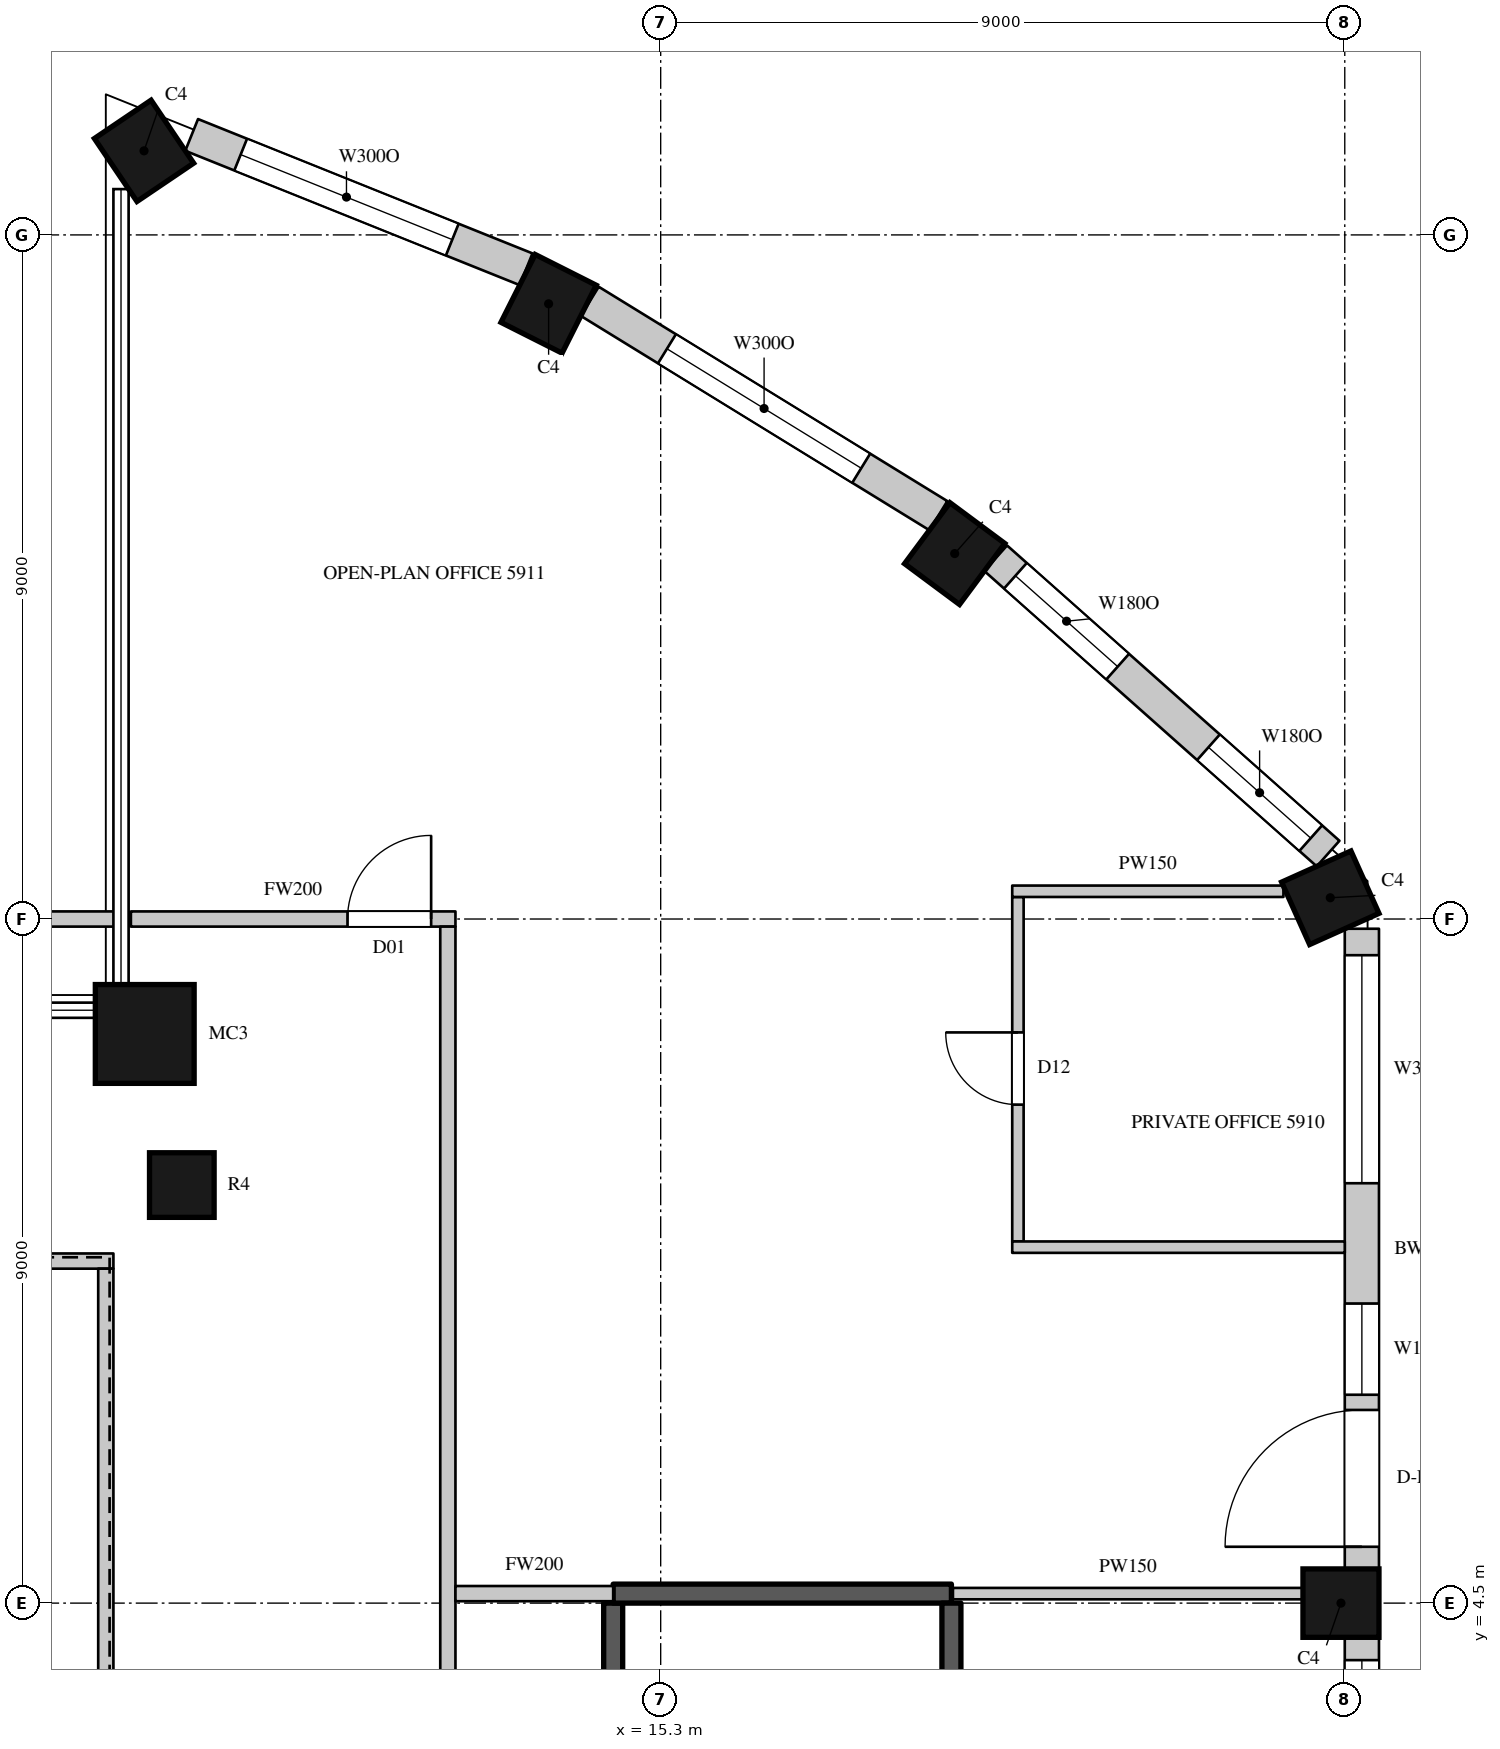
"""IFC4 building model, lengths in metres.
Left out: names, types, materials, properties, quantities, classifications, styles, units other than length and angle.
Written with IfcOpenShell. Run it as: python <this file> out.ifc"""

import sys

from ifc_helpers import new_model, si_unit, direction, frame, frame_2d, origin, origin_2d, place, context, subcontext, project, spatial, rectangle, circle, extrude, element, fill, save


model = new_model("IFC4")
c1 = context("Model", 3, precision=1e-05, world=origin(), true_north=direction((0.0, 1.0)))
c2 = subcontext(c1, "Body", "Model", "MODEL_VIEW")
j1 = project(units=[si_unit("LENGTHUNIT", "METRE"), si_unit("PLANEANGLEUNIT", "RADIAN")], contexts=[c1])
p1 = place(None, origin())
s1 = spatial("IfcSite", under=j1, at=p1, CompositionType="ELEMENT")
p2 = place(p1, origin())
s2 = spatial("IfcBuilding", under=s1, at=p2, CompositionType="ELEMENT")
p3 = place(p2, frame((0.0, 0.0, 263.9)))
s3 = spatial("IfcBuildingStorey", under=s2, at=p3, CompositionType="ELEMENT", Elevation=263.9)
p4 = place(p3, frame((8.503, 23.606, 0.0), z_axis=(0.0, 0.0, 1.0), x_axis=(-0.828469606019, -0.560034027451, 0.0)))
e1 = element("IfcColumn", 1, at=p4, inside=s3, PredefinedType="COLUMN", context=c2, shape_type="SweptSolid", body=[
    extrude(rectangle(XDim=0.9, YDim=1.0, at=origin_2d()), origin(), (0.0, 0.0, 1.0), 4.1),
])
p5 = place(p3, frame((8.512, 11.988, 0.0), z_axis=(0.0, 0.0, 1.0), x_axis=(1.0, 0.0, 0.0)))
e2 = element("IfcColumn", 2, at=p5, inside=s3, PredefinedType="COLUMN", context=c2, shape_type="SweptSolid", body=[
    extrude(circle(Radius=0.65, at=origin_2d()), origin(), (0.0, 0.0, 1.0), 4.1),
])
for number, where, z_axis, x_axis in (
    (3, (24.25, 4.5, 0.0), (0.0, 0.0, 1.0), (0.0, 1.0, 0.0)),
    (4, (24.11, 13.78, 0.0), (0.0, 0.0, 1.0), (-0.41, 0.912, 0.0)),
    (5, (19.168, 18.308, 0.0), (0.0, 0.0, 1.0), (-0.803, 0.596, 0.0)),
    (6, (13.826, 21.594, 0.0), (0.0, 0.0, 1.0), (-0.893, 0.45, 0.0)),
):
    element("IfcColumn", number, at=place(p3, frame(where, z_axis=z_axis, x_axis=x_axis)), inside=s3, PredefinedType="COLUMN", context=c2, shape_type="SweptSolid", body=[
        extrude(rectangle(XDim=0.9, YDim=1.0, at=origin_2d()), origin(), (0.0, 0.0, 1.0), 4.1),
    ])
p6 = place(p3, frame((9.0, 10.0, 0.0), z_axis=(0.0, 0.0, 1.0), x_axis=(1.0, 0.0, 0.0)))
e7 = element("IfcColumn", 7, at=p6, inside=s3, PredefinedType="COLUMN", context=c2, shape_type="SweptSolid", body=[
    extrude(circle(Radius=0.425, at=origin_2d()), origin(), (0.0, 0.0, 1.0), 4.1),
])
p7 = place(p3, frame((24.525, -4.05, 0.0), z_axis=(0.0, 0.0, 1.0), x_axis=(0.0, 1.0, 0.0)))
e8 = element("IfcWall", 8, at=p7, inside=s3, PredefinedType="SOLIDWALL", context=c2, shape_type="SweptSolid", body=[
    extrude(rectangle(XDim=8.1, YDim=0.45, at=frame_2d((4.05, 0.0))), origin(), (0.0, 0.0, 1.0), 3.8),
])
p8 = place(p7, frame((0.3, 0.0, 1.05)))
e9 = element("IfcOpeningElement", 9, at=p8, cuts=e8, PredefinedType="OPENING", context=c2, shape_type="SweptSolid", body=[
    extrude(rectangle(XDim=3.0, YDim=2.4, at=frame_2d((1.5, 1.2))), frame((0.0, 0.235, 0.0), z_axis=(0.0, -1.0, 0.0), x_axis=(1.0, 0.0, 0.0)), (0.0, 0.0, 1.0), 0.47),
])
p9 = place(p7, frame((4.8, 0.0, 1.05)))
e10 = element("IfcOpeningElement", 10, at=p9, cuts=e8, PredefinedType="OPENING", context=c2, shape_type="SweptSolid", body=[
    extrude(rectangle(XDim=3.0, YDim=2.4, at=frame_2d((1.5, 1.2))), frame((0.0, 0.235, 0.0), z_axis=(0.0, -1.0, 0.0), x_axis=(1.0, 0.0, 0.0)), (0.0, 0.0, 1.0), 0.47),
])
p10 = place(p3, frame((24.525, 4.95, 0.0), z_axis=(0.0, 0.0, 1.0), x_axis=(0.0, 1.0, 0.0)))
e11 = element("IfcWall", 11, at=p10, inside=s3, PredefinedType="SOLIDWALL", context=c2, shape_type="SweptSolid", body=[
    extrude(rectangle(XDim=8.422, YDim=0.45, at=frame_2d((4.211, 0.0))), origin(), (0.0, 0.0, 1.0), 3.8),
])
p11 = place(p10, frame((0.291, 0.0, 0.0)))
e12 = element("IfcOpeningElement", 12, at=p11, cuts=e11, PredefinedType="OPENING", context=c2, shape_type="SweptSolid", body=[
    extrude(rectangle(XDim=1.8, YDim=2.4, at=frame_2d((0.9, 1.2))), frame((0.0, 0.235, 0.0), z_axis=(0.0, -1.0, 0.0), x_axis=(1.0, 0.0, 0.0)), (0.0, 0.0, 1.0), 0.47),
])
p12 = place(p10, frame((2.291, 0.0, 1.05)))
e13 = element("IfcOpeningElement", 13, at=p12, cuts=e11, PredefinedType="OPENING", context=c2, shape_type="SweptSolid", body=[
    extrude(rectangle(XDim=1.2, YDim=2.4, at=frame_2d((0.6, 1.2))), frame((0.0, 0.235, 0.0), z_axis=(0.0, -1.0, 0.0), x_axis=(1.0, 0.0, 0.0)), (0.0, 0.0, 1.0), 0.47),
])
p13 = place(p10, frame((5.074, 0.0, 1.05)))
e14 = element("IfcOpeningElement", 14, at=p13, cuts=e11, PredefinedType="OPENING", context=c2, shape_type="SweptSolid", body=[
    extrude(rectangle(XDim=3.0, YDim=2.4, at=frame_2d((1.5, 1.2))), frame((0.0, 0.235, 0.0), z_axis=(0.0, -1.0, 0.0), x_axis=(1.0, 0.0, 0.0)), (0.0, 0.0, 1.0), 0.47),
])
p14 = place(p3, frame((24.081, 14.361, 0.0), z_axis=(0.0, 0.0, 1.0), x_axis=(-0.747570482973, 0.664182484704, 0.0)))
e15 = element("IfcWall", 15, at=p14, inside=s3, PredefinedType="SOLIDWALL", context=c2, shape_type="SweptSolid", body=[
    extrude(rectangle(XDim=5.85, YDim=0.45, at=frame_2d((2.925, 0.0))), origin(), (0.0, 0.0, 1.0), 3.8),
])
p15 = place(p14, frame((0.305, 0.0, 1.05)))
e16 = element("IfcOpeningElement", 16, at=p15, cuts=e15, PredefinedType="OPENING", context=c2, shape_type="SweptSolid", body=[
    extrude(rectangle(XDim=1.8, YDim=2.4, at=frame_2d((0.9, 1.2))), frame((0.0, 0.235, 0.0), z_axis=(0.0, -1.0, 0.0), x_axis=(1.0, 0.0, 0.0)), (0.0, 0.0, 1.0), 0.47),
])
p16 = place(p14, frame((3.703, 0.0, 1.05)))
e17 = element("IfcOpeningElement", 17, at=p16, cuts=e15, PredefinedType="OPENING", context=c2, shape_type="SweptSolid", body=[
    extrude(rectangle(XDim=1.8, YDim=2.4, at=frame_2d((0.9, 1.2))), frame((0.0, 0.235, 0.0), z_axis=(0.0, -1.0, 0.0), x_axis=(1.0, 0.0, 0.0)), (0.0, 0.0, 1.0), 0.47),
])
p17 = place(p3, frame((18.953, 18.806, 0.0), z_axis=(0.0, 0.0, 1.0), x_axis=(-0.851860664503, 0.523768468193, 0.0)))
e18 = element("IfcWall", 18, at=p17, inside=s3, PredefinedType="SOLIDWALL", context=c2, shape_type="SweptSolid", body=[
    extrude(rectangle(XDim=5.384, YDim=0.45, at=frame_2d((2.692, 0.0))), origin(), (0.0, 0.0, 1.0), 3.8),
])
p18 = place(p17, frame((1.192, 0.0, 1.05)))
e19 = element("IfcOpeningElement", 19, at=p18, cuts=e18, PredefinedType="OPENING", context=c2, shape_type="SweptSolid", body=[
    extrude(rectangle(XDim=3.0, YDim=2.4, at=frame_2d((1.5, 1.2))), frame((0.0, 0.235, 0.0), z_axis=(0.0, -1.0, 0.0), x_axis=(1.0, 0.0, 0.0)), (0.0, 0.0, 1.0), 0.47),
])
p19 = place(p3, frame((13.529, 22.048, 0.0), z_axis=(0.0, 0.0, 1.0), x_axis=(-0.927957332619, 0.372686448424, 0.0)))
e20 = element("IfcWall", 20, at=p19, inside=s3, PredefinedType="SOLIDWALL", context=c2, shape_type="SweptSolid", body=[
    extrude(rectangle(XDim=4.741, YDim=0.45, at=frame_2d((2.371, 0.0))), origin(), (0.0, 0.0, 1.0), 3.8),
])
p20 = place(p19, frame((1.047, 0.0, 1.05)))
e21 = element("IfcOpeningElement", 21, at=p20, cuts=e20, PredefinedType="OPENING", context=c2, shape_type="SweptSolid", body=[
    extrude(rectangle(XDim=3.0, YDim=2.4, at=frame_2d((1.5, 1.2))), frame((0.0, 0.235, 0.0), z_axis=(0.0, -1.0, 0.0), x_axis=(1.0, 0.0, 0.0)), (0.0, 0.0, 1.0), 0.47),
])
p21 = place(p3, frame((-6.27, 13.5, 0.0), z_axis=(0.0, 0.0, 1.0), x_axis=(1.0, 0.0, 0.0)))
e22 = element("IfcWall", 22, at=p21, inside=s3, PredefinedType="PARTITIONING", context=c2, shape_type="SweptSolid", body=[
    extrude(rectangle(XDim=14.57, YDim=0.2, at=frame_2d((7.285, 0.0))), origin(), (0.0, 0.0, 1.0), 3.8),
])
p22 = place(p3, frame((-6.1, 9.0, 0.0), z_axis=(0.0, 0.0, 1.0), x_axis=(1.0, 0.0, 0.0)))
e23 = element("IfcWall", 23, at=p22, inside=s3, PredefinedType="PARTITIONING", context=c2, shape_type="SweptSolid", body=[
    extrude(rectangle(XDim=14.2, YDim=0.2, at=frame_2d((7.1, 0.0))), origin(), (0.0, 0.0, 1.0), 3.8),
])
p23 = place(p3, frame((8.0, -8.9, 0.0), z_axis=(0.0, 0.0, 1.0), x_axis=(0.0, 1.0, 0.0)))
e24 = element("IfcWall", 24, at=p23, inside=s3, PredefinedType="PARTITIONING", context=c2, shape_type="SweptSolid", body=[
    extrude(rectangle(XDim=17.8, YDim=0.2, at=frame_2d((8.9, 0.0))), origin(), (0.0, 0.0, 1.0), 3.8),
])
p24 = place(p3, frame((8.33, 13.5, 0.0), z_axis=(0.0, 0.0, 1.0), x_axis=(1.0, 0.0, 0.0)))
e25 = element("IfcWall", 25, at=p24, inside=s3, PredefinedType="PARTITIONING", context=c2, shape_type="SweptSolid", body=[
    extrude(rectangle(XDim=4.27, YDim=0.2, at=frame_2d((2.135, 0.0))), origin(), (0.0, 0.0, 1.0), 3.8),
])
p25 = place(p24, frame((2.85, 0.0, 0.0)))
e26 = element("IfcOpeningElement", 26, at=p25, cuts=e25, PredefinedType="OPENING", context=c2, shape_type="SweptSolid", body=[
    extrude(rectangle(XDim=1.1, YDim=2.4, at=frame_2d((0.55, 1.2))), frame((0.0, 0.11, 0.0), z_axis=(0.0, -1.0, 0.0), x_axis=(1.0, 0.0, 0.0)), (0.0, 0.0, 1.0), 0.22),
])
p26 = place(p3, frame((12.5, -13.5, 0.0), z_axis=(0.0, 0.0, 1.0), x_axis=(0.0, 1.0, 0.0)))
e27 = element("IfcWall", 27, at=p26, inside=s3, PredefinedType="PARTITIONING", context=c2, shape_type="SweptSolid", body=[
    extrude(rectangle(XDim=26.9, YDim=0.2, at=frame_2d((13.45, 0.0))), origin(), (0.0, 0.0, 1.0), 3.8),
])
p27 = place(p26, frame((12.75, 0.0, 0.0)))
e28 = element("IfcOpeningElement", 28, at=p27, cuts=e27, PredefinedType="OPENING", context=c2, shape_type="SweptSolid", body=[
    extrude(rectangle(XDim=1.5, YDim=2.4, at=frame_2d((0.75, 1.2))), frame((0.0, 0.11, 0.0), z_axis=(0.0, -1.0, 0.0), x_axis=(1.0, 0.0, 0.0)), (0.0, 0.0, 1.0), 0.22),
])
p28 = place(p3, frame((12.6, 4.625, 0.0), z_axis=(0.0, 0.0, 1.0), x_axis=(1.0, 0.0, 0.0)))
e29 = element("IfcWall", 29, at=p28, inside=s3, PredefinedType="PARTITIONING", context=c2, shape_type="SweptSolid", body=[
    extrude(rectangle(XDim=2.075, YDim=0.2, at=frame_2d((1.038, 0.0))), origin(), (0.0, 0.0, 1.0), 3.8),
])
p29 = place(p3, frame((19.145, 4.625, 0.0), z_axis=(0.0, 0.0, 1.0), x_axis=(1.0, 0.0, 0.0)))
e30 = element("IfcWall", 30, at=p29, inside=s3, PredefinedType="PARTITIONING", context=c2, shape_type="SweptSolid", body=[
    extrude(rectangle(XDim=4.605, YDim=0.15, at=frame_2d((2.302, 0.0))), origin(), (0.0, 0.0, 1.0), 3.8),
])
p30 = place(p3, frame((20.0, 9.258, 0.0), z_axis=(0.0, 0.0, 1.0), x_axis=(0.0, 1.0, 0.0)))
e31 = element("IfcWall", 31, at=p30, inside=s3, PredefinedType="PARTITIONING", context=c2, shape_type="SweptSolid", body=[
    extrude(rectangle(XDim=4.532, YDim=0.15, at=frame_2d((2.266, 0.0))), origin(), (0.0, 0.0, 1.0), 3.8),
])
p31 = place(p30, frame((1.8, 0.0, 0.0)))
e32 = element("IfcOpeningElement", 32, at=p31, cuts=e31, PredefinedType="OPENING", context=c2, shape_type="SweptSolid", body=[
    extrude(rectangle(XDim=0.95, YDim=2.2, at=frame_2d((0.475, 1.1))), frame((0.0, 0.085, 0.0), z_axis=(0.0, -1.0, 0.0), x_axis=(1.0, 0.0, 0.0)), (0.0, 0.0, 1.0), 0.17),
])
p32 = place(p3, frame((19.925, 9.183, 0.0), z_axis=(0.0, 0.0, 1.0), x_axis=(1.0, 0.0, 0.0)))
e33 = element("IfcWall", 33, at=p32, inside=s3, PredefinedType="PARTITIONING", context=c2, shape_type="SweptSolid", body=[
    extrude(rectangle(XDim=4.375, YDim=0.15, at=frame_2d((2.188, 0.0))), origin(), (0.0, 0.0, 1.0), 3.15),
])
p33 = place(p3, frame((19.925, 13.865, 0.0), z_axis=(0.0, 0.0, 1.0), x_axis=(1.0, 0.0, 0.0)))
e34 = element("IfcWall", 34, at=p33, inside=s3, PredefinedType="PARTITIONING", context=c2, shape_type="SweptSolid", body=[
    extrude(rectangle(XDim=3.568, YDim=0.15, at=frame_2d((1.784, 0.0))), origin(), (0.0, 0.0, 1.0), 3.8),
])
p34 = place(p3, frame((14.675, -4.5, 0.0), z_axis=(0.0, 0.0, 1.0), x_axis=(0.0, 1.0, 0.0)))
e35 = element("IfcWall", 35, at=p34, inside=s3, PredefinedType="SHEAR", context=c2, shape_type="SweptSolid", body=[
    extrude(rectangle(XDim=9.0, YDim=0.25, at=frame_2d((4.5, 0.0))), origin(), (0.0, 0.0, 1.0), 3.8),
])
p35 = place(p34, frame((0.45, 0.0, 0.0)))
e36 = element("IfcOpeningElement", 36, at=p35, cuts=e35, PredefinedType="OPENING", context=c2, shape_type="SweptSolid", body=[
    extrude(rectangle(XDim=1.1, YDim=2.2, at=frame_2d((0.55, 1.1))), frame((0.0, 0.135, 0.0), z_axis=(0.0, -1.0, 0.0), x_axis=(1.0, 0.0, 0.0)), (0.0, 0.0, 1.0), 0.27),
])
p36 = place(p3, frame((14.675, 4.625, 0.0), z_axis=(0.0, 0.0, 1.0), x_axis=(1.0, 0.0, 0.0)))
e37 = element("IfcWall", 37, at=p36, inside=s3, PredefinedType="SHEAR", context=c2, shape_type="SweptSolid", body=[
    extrude(rectangle(XDim=4.45, YDim=0.25, at=frame_2d((2.225, 0.0))), origin(), (0.0, 0.0, 1.0), 3.8),
])
p37 = place(p3, frame((19.125, -4.5, 0.0), z_axis=(0.0, 0.0, 1.0), x_axis=(0.0, 1.0, 0.0)))
e38 = element("IfcWall", 38, at=p37, inside=s3, PredefinedType="SHEAR", context=c2, shape_type="SweptSolid", body=[
    extrude(rectangle(XDim=9.0, YDim=0.25, at=frame_2d((4.5, 0.0))), origin(), (0.0, 0.0, 1.0), 3.8),
])
p38 = place(p9, origin())
e39 = element("IfcWindow", 39, at=p38, inside=s3, PartitioningType="SINGLE_PANEL", PredefinedType="WINDOW", context=c2, shape_type="SweptSolid", body=[
    extrude(rectangle(XDim=3.0, YDim=2.4, at=frame_2d((1.5, 1.2))), frame((0.0, 0.135, 0.0), z_axis=(0.0, -1.0, 0.0), x_axis=(1.0, 0.0, 0.0)), (0.0, 0.0, 1.0), 0.06),
])
fill(e10, e39)
p39 = place(p11, origin())
e40 = element("IfcDoor", 40, at=p39, inside=s3, OperationType="SLIDING_TO_LEFT", PredefinedType="DOOR", context=c2, shape_type="SweptSolid", body=[
    extrude(rectangle(XDim=1.8, YDim=2.4, at=frame_2d((0.9, 1.2))), frame((0.0, 0.13, 0.0), z_axis=(0.0, -1.0, 0.0), x_axis=(1.0, 0.0, 0.0)), (0.0, 0.0, 1.0), 0.05),
])
fill(e12, e40)
p40 = place(p12, origin())
e41 = element("IfcWindow", 41, at=p40, inside=s3, PartitioningType="SINGLE_PANEL", PredefinedType="WINDOW", context=c2, shape_type="SweptSolid", body=[
    extrude(rectangle(XDim=1.2, YDim=2.4, at=frame_2d((0.6, 1.2))), frame((0.0, 0.135, 0.0), z_axis=(0.0, -1.0, 0.0), x_axis=(1.0, 0.0, 0.0)), (0.0, 0.0, 1.0), 0.06),
])
fill(e13, e41)
p41 = place(p13, origin())
e42 = element("IfcWindow", 42, at=p41, inside=s3, PartitioningType="SINGLE_PANEL", PredefinedType="WINDOW", context=c2, shape_type="SweptSolid", body=[
    extrude(rectangle(XDim=3.0, YDim=2.4, at=frame_2d((1.5, 1.2))), frame((0.0, 0.135, 0.0), z_axis=(0.0, -1.0, 0.0), x_axis=(1.0, 0.0, 0.0)), (0.0, 0.0, 1.0), 0.06),
])
fill(e14, e42)
p42 = place(p15, origin())
e43 = element("IfcWindow", 43, at=p42, inside=s3, PartitioningType="SINGLE_PANEL", PredefinedType="WINDOW", context=c2, shape_type="SweptSolid", body=[
    extrude(rectangle(XDim=1.8, YDim=2.4, at=frame_2d((0.9, 1.2))), frame((0.0, 0.135, 0.0), z_axis=(0.0, -1.0, 0.0), x_axis=(1.0, 0.0, 0.0)), (0.0, 0.0, 1.0), 0.06),
])
fill(e16, e43)
p43 = place(p16, origin())
e44 = element("IfcWindow", 44, at=p43, inside=s3, PartitioningType="SINGLE_PANEL", PredefinedType="WINDOW", context=c2, shape_type="SweptSolid", body=[
    extrude(rectangle(XDim=1.8, YDim=2.4, at=frame_2d((0.9, 1.2))), frame((0.0, 0.135, 0.0), z_axis=(0.0, -1.0, 0.0), x_axis=(1.0, 0.0, 0.0)), (0.0, 0.0, 1.0), 0.06),
])
fill(e17, e44)
p44 = place(p18, origin())
e45 = element("IfcWindow", 45, at=p44, inside=s3, PartitioningType="SINGLE_PANEL", PredefinedType="WINDOW", context=c2, shape_type="SweptSolid", body=[
    extrude(rectangle(XDim=3.0, YDim=2.4, at=frame_2d((1.5, 1.2))), frame((0.0, 0.135, 0.0), z_axis=(0.0, -1.0, 0.0), x_axis=(1.0, 0.0, 0.0)), (0.0, 0.0, 1.0), 0.06),
])
fill(e19, e45)
p45 = place(p20, origin())
e46 = element("IfcWindow", 46, at=p45, inside=s3, PartitioningType="SINGLE_PANEL", PredefinedType="WINDOW", context=c2, shape_type="SweptSolid", body=[
    extrude(rectangle(XDim=3.0, YDim=2.4, at=frame_2d((1.5, 1.2))), frame((0.0, 0.135, 0.0), z_axis=(0.0, -1.0, 0.0), x_axis=(1.0, 0.0, 0.0)), (0.0, 0.0, 1.0), 0.06),
])
fill(e21, e46)
p46 = place(p25, origin())
e47 = element("IfcDoor", 47, at=p46, inside=s3, OperationType="SINGLE_SWING_RIGHT", PredefinedType="DOOR", context=c2, shape_type="SweptSolid", body=[
    extrude(rectangle(XDim=1.1, YDim=2.4, at=frame_2d((0.55, 1.2))), frame((0.0, 0.025, 0.0), z_axis=(0.0, -1.0, 0.0), x_axis=(1.0, 0.0, 0.0)), (0.0, 0.0, 1.0), 0.05),
])
fill(e26, e47)
p47 = place(p31, origin())
e48 = element("IfcDoor", 48, at=p47, inside=s3, OperationType="SINGLE_SWING_RIGHT", PredefinedType="DOOR", context=c2, shape_type="SweptSolid", body=[
    extrude(rectangle(XDim=0.95, YDim=2.2, at=frame_2d((0.475, 1.1))), frame((0.0, 0.025, 0.0), z_axis=(0.0, -1.0, 0.0), x_axis=(1.0, 0.0, 0.0)), (0.0, 0.0, 1.0), 0.05),
])
fill(e32, e48)
save(model, sys.argv[1])
